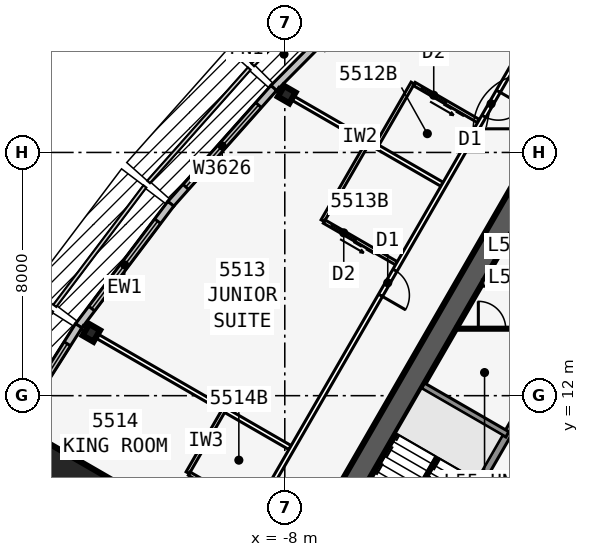
"""IFC4 building model, lengths in metres.
Left out: names, types, materials, properties, quantities, classifications, styles, units other than length and angle.
Written with IfcOpenShell. Run it as: python <this file> out.ifc"""

import sys

from ifc_helpers import new_model, si_unit, direction, frame, frame_2d, origin, origin_2d, place, context, subcontext, project, spatial, rectangle, i_section, extrude, element, fill, save


model = new_model("IFC4")
c1 = context("Model", 3, precision=1e-05, world=origin(), true_north=direction((0.0, 1.0)))
c2 = subcontext(c1, "Body", "Model", "MODEL_VIEW")
j1 = project(units=[si_unit("LENGTHUNIT", "METRE"), si_unit("PLANEANGLEUNIT", "RADIAN")], contexts=[c1])
p1 = place(None, origin())
s1 = spatial("IfcSite", under=j1, at=p1, CompositionType="ELEMENT")
p2 = place(p1, origin())
s2 = spatial("IfcBuilding", under=s1, at=p2, CompositionType="ELEMENT")
p3 = place(p2, frame((0.0, 0.0, 208.1)))
s3 = spatial("IfcBuildingStorey", under=s2, at=p3, CompositionType="ELEMENT", Elevation=208.1)
p4 = place(p3, frame((0.0, 19.052, 0.0), z_axis=(0.0, 0.0, 1.0), x_axis=(-0.499999749417, -0.866025548458, 0.0)))
e1 = element("IfcWall", 1, at=p4, inside=s3, PredefinedType="SHEAR", context=c2, shape_type="SweptSolid", body=[
    extrude(rectangle(XDim=33.0, YDim=0.75, at=frame_2d((16.5, 0.0))), origin(), (0.0, 0.0, 1.0), 3.6),
])
p5 = place(p4, frame((14.15, 0.0, 0.0)))
e2 = element("IfcOpeningElement", 2, at=p5, cuts=e1, PredefinedType="OPENING", context=c2, shape_type="SweptSolid", body=[
    extrude(rectangle(XDim=1.8, YDim=2.13, at=frame_2d((0.9, 1.065))), frame((0.0, 0.385, 0.0), z_axis=(0.0, -1.0, 0.0), x_axis=(1.0, 0.0, 0.0)), (0.0, 0.0, 1.0), 0.77),
])
p6 = place(p4, frame((12.6, 0.0, 0.0)))
e3 = element("IfcOpeningElement", 3, at=p6, cuts=e1, PredefinedType="OPENING", context=c2, shape_type="SweptSolid", body=[
    extrude(rectangle(XDim=1.0, YDim=2.13, at=frame_2d((0.5, 1.065))), frame((0.0, 0.385, 0.0), z_axis=(0.0, -1.0, 0.0), x_axis=(1.0, 0.0, 0.0)), (0.0, 0.0, 1.0), 0.77),
])
p7 = place(p3, frame((-0.062, 11.794, 0.0), z_axis=(0.0, 0.0, 1.0), x_axis=(-0.500006680225, -0.86602154692, 0.0)))
e4 = element("IfcWall", 4, at=p7, inside=s3, PredefinedType="SOLIDWALL", context=c2, shape_type="SweptSolid", body=[
    extrude(rectangle(XDim=7.733, YDim=0.25, at=frame_2d((3.866, 0.0))), origin(), (0.0, 0.0, 1.0), 3.435),
])
p8 = place(p3, frame((-0.679, 10.727, 0.0), z_axis=(0.0, 0.0, 1.0), x_axis=(-0.866008981251, 0.500028443584, 0.0)))
e5 = element("IfcWall", 5, at=p8, inside=s3, PredefinedType="SOLIDWALL", context=c2, shape_type="SweptSolid", body=[
    extrude(rectangle(XDim=3.2, YDim=0.2, at=frame_2d((1.6, 0.0))), origin(), (0.0, 0.0, 1.0), 3.435),
])
for number, where, z_axis, x_axis in (
    (6, (-7.937, 21.903, 0.0), (0.0, 0.0, 1.0), (-0.5, -0.866, 0.0)),
    (7, (-14.363, 14.066, 0.0), (0.0, 0.0, 1.0), (-0.866, 0.5, 0.0)),
):
    element("IfcColumn", number, at=place(p3, frame(where, z_axis=z_axis, x_axis=x_axis)), inside=s3, PredefinedType="COLUMN", context=c2, shape_type="SweptSolid", body=[
        extrude(i_section(OverallWidth=0.411, OverallDepth=0.434, WebThickness=0.036, FlangeThickness=0.057, at=origin_2d()), origin(), (0.0, 0.0, 1.0), 3.6),
    ])
p9 = place(p3, frame((-15.312, 8.84, 0.0), z_axis=(0.0, 0.0, 1.0), x_axis=(-0.866025403784, 0.5, 0.0)))
e8 = element("IfcColumn", 8, at=p9, inside=s3, PredefinedType="COLUMN", context=c2, shape_type="SweptSolid", body=[
    extrude(rectangle(XDim=2.3, YDim=2.3, at=origin_2d()), origin(), (0.0, 0.0, 1.0), 3.6),
])
p10 = place(p3, frame((-6.911, 23.583, 0.0), z_axis=(0.0, 0.0, 1.0), x_axis=(-0.704149946111, -0.710051303352, 0.0)))
e9 = element("IfcWall", 9, at=p10, inside=s3, PredefinedType="STANDARD", context=c2, shape_type="SweptSolid", body=[
    extrude(rectangle(XDim=2.069, YDim=0.25, at=frame_2d((1.034, 0.0))), origin(), (0.0, 0.0, 1.0), 3.435),
])
p11 = place(p3, frame((-8.363, 22.12, 0.0), z_axis=(0.0, 0.0, 1.0), x_axis=(-0.664348996191, -0.747422511876, 0.0)))
e10 = element("IfcWall", 10, at=p11, inside=s3, PredefinedType="STANDARD", context=c2, shape_type="SweptSolid", body=[
    extrude(rectangle(XDim=5.105, YDim=0.25, at=frame_2d((2.552, 0.0))), origin(), (0.0, 0.0, 1.0), 3.435),
])
p12 = place(p11, frame((0.752, 0.0, 0.45)))
e11 = element("IfcOpeningElement", 11, at=p12, cuts=e10, PredefinedType="OPENING", context=c2, shape_type="SweptSolid", body=[
    extrude(rectangle(XDim=3.6, YDim=2.6, at=frame_2d((1.8, 1.3))), frame((0.0, 0.135, 0.0), z_axis=(0.0, -1.0, 0.0), x_axis=(1.0, 0.0, 0.0)), (0.0, 0.0, 1.0), 0.27),
])
p13 = place(p3, frame((-11.748, 18.312, 0.0), z_axis=(0.0, 0.0, 1.0), x_axis=(-0.602408653511, -0.798187831388, 0.0)))
e12 = element("IfcWall", 12, at=p13, inside=s3, PredefinedType="STANDARD", context=c2, shape_type="SweptSolid", body=[
    extrude(rectangle(XDim=5.038, YDim=0.25, at=frame_2d((2.519, 0.0))), origin(), (0.0, 0.0, 1.0), 3.435),
])
p14 = place(p13, frame((0.719, 0.0, 0.45)))
e13 = element("IfcOpeningElement", 13, at=p14, cuts=e12, PredefinedType="OPENING", context=c2, shape_type="SweptSolid", body=[
    extrude(rectangle(XDim=3.6, YDim=2.6, at=frame_2d((1.8, 1.3))), frame((0.0, 0.135, 0.0), z_axis=(0.0, -1.0, 0.0), x_axis=(1.0, 0.0, 0.0)), (0.0, 0.0, 1.0), 0.27),
])
p15 = place(p3, frame((-14.777, 14.299, 0.0), z_axis=(0.0, 0.0, 1.0), x_axis=(-0.535220361449, -0.844712474568, 0.0)))
e14 = element("IfcWall", 14, at=p15, inside=s3, PredefinedType="STANDARD", context=c2, shape_type="SweptSolid", body=[
    extrude(rectangle(XDim=5.004, YDim=0.25, at=frame_2d((2.502, 0.0))), origin(), (0.0, 0.0, 1.0), 3.435),
])
p16 = place(p15, frame((0.702, 0.0, 0.45)))
e15 = element("IfcOpeningElement", 15, at=p16, cuts=e14, PredefinedType="OPENING", context=c2, shape_type="SweptSolid", body=[
    extrude(rectangle(XDim=3.6, YDim=2.6, at=frame_2d((1.8, 1.3))), frame((0.0, 0.135, 0.0), z_axis=(0.0, -1.0, 0.0), x_axis=(1.0, 0.0, 0.0)), (0.0, 0.0, 1.0), 0.27),
])
p17 = place(p3, frame((-0.425, 22.966, 0.0), z_axis=(0.0, 0.0, 1.0), x_axis=(-0.500000265775, -0.866025250339, 0.0)))
e16 = element("IfcWall", 16, at=p17, inside=s3, PredefinedType="PARTITIONING", context=c2, shape_type="SweptSolid", body=[
    extrude(rectangle(XDim=39.354, YDim=0.15, at=frame_2d((19.677, 0.0))), origin(), (0.0, 0.0, 1.0), 3.435),
])
p18 = place(p17, frame((1.102, 0.0, 0.0)))
e17 = element("IfcOpeningElement", 17, at=p18, cuts=e16, PredefinedType="OPENING", context=c2, shape_type="SweptSolid", body=[
    extrude(rectangle(XDim=0.95, YDim=2.13, at=frame_2d((0.475, 1.065))), frame((0.0, 0.085, 0.0), z_axis=(0.0, -1.0, 0.0), x_axis=(1.0, 0.0, 0.0)), (0.0, 0.0, 1.0), 0.17),
])
p19 = place(p17, frame((7.902, 0.0, 0.0)))
e18 = element("IfcOpeningElement", 18, at=p19, cuts=e16, PredefinedType="OPENING", context=c2, shape_type="SweptSolid", body=[
    extrude(rectangle(XDim=0.95, YDim=2.13, at=frame_2d((0.475, 1.065))), frame((0.0, 0.085, 0.0), z_axis=(0.0, -1.0, 0.0), x_axis=(1.0, 0.0, 0.0)), (0.0, 0.0, 1.0), 0.17),
])
p20 = place(p17, frame((17.302, 0.0, 0.0)))
e19 = element("IfcOpeningElement", 19, at=p20, cuts=e16, PredefinedType="OPENING", context=c2, shape_type="SweptSolid", body=[
    extrude(rectangle(XDim=0.95, YDim=2.13, at=frame_2d((0.475, 1.065))), frame((0.0, 0.085, 0.0), z_axis=(0.0, -1.0, 0.0), x_axis=(1.0, 0.0, 0.0)), (0.0, 0.0, 1.0), 0.17),
])
p21 = place(p17, frame((26.702, 0.0, 0.0)))
e20 = element("IfcOpeningElement", 20, at=p21, cuts=e16, PredefinedType="OPENING", context=c2, shape_type="SweptSolid", body=[
    extrude(rectangle(XDim=0.95, YDim=2.13, at=frame_2d((0.475, 1.065))), frame((0.0, 0.085, 0.0), z_axis=(0.0, -1.0, 0.0), x_axis=(1.0, 0.0, 0.0)), (0.0, 0.0, 1.0), 0.17),
])
p22 = place(p17, frame((37.302, 0.0, 0.0)))
e21 = element("IfcOpeningElement", 21, at=p22, cuts=e16, PredefinedType="OPENING", context=c2, shape_type="SweptSolid", body=[
    extrude(rectangle(XDim=0.95, YDim=2.13, at=frame_2d((0.475, 1.065))), frame((0.0, 0.085, 0.0), z_axis=(0.0, -1.0, 0.0), x_axis=(1.0, 0.0, 0.0)), (0.0, 0.0, 1.0), 0.17),
])
p23 = place(p3, frame((-2.829, 18.954, 0.0), z_axis=(0.0, 0.0, 1.0), x_axis=(-0.866026604282, 0.499997920671, 0.0)))
e22 = element("IfcWall", 22, at=p23, inside=s3, PredefinedType="PARTITIONING", context=c2, shape_type="SweptSolid", body=[
    extrude(rectangle(XDim=6.24, YDim=0.15, at=frame_2d((3.12, 0.0))), origin(), (0.0, 0.0, 1.0), 2.589),
])
p24 = place(p3, frame((-7.829, 10.293, 0.0), z_axis=(0.0, 0.0, 1.0), x_axis=(-0.866030558329, 0.49999107196, 0.0)))
e23 = element("IfcWall", 23, at=p24, inside=s3, PredefinedType="PARTITIONING", context=c2, shape_type="SweptSolid", body=[
    extrude(rectangle(XDim=7.894, YDim=0.15, at=frame_2d((3.947, 0.0))), origin(), (0.0, 0.0, 1.0), 2.589),
])
p25 = place(p3, frame((-10.329, 5.963, 0.0), z_axis=(0.0, 0.0, 1.0), x_axis=(-0.866016460812, 0.500015489362, 0.0)))
e24 = element("IfcWall", 24, at=p25, inside=s3, PredefinedType="PARTITIONING", context=c2, shape_type="SweptSolid", body=[
    extrude(rectangle(XDim=8.101, YDim=0.15, at=frame_2d((4.051, 0.0))), origin(), (0.0, 0.0, 1.0), 2.589),
])
p26 = place(p3, frame((-3.793, 22.282, 0.0), z_axis=(0.0, 0.0, 1.0), x_axis=(-0.500001309137, -0.866024647952, 0.0)))
e25 = element("IfcWall", 25, at=p26, inside=s3, PredefinedType="PLUMBINGWALL", context=c2, shape_type="SweptSolid", body=[
    extrude(rectangle(XDim=2.4, YDim=0.12, at=frame_2d((1.2, 0.0))), origin(), (0.0, 0.0, 1.0), 3.435),
])
p27 = place(p3, frame((-1.628, 21.032, 0.0), z_axis=(0.0, 0.0, 1.0), x_axis=(-0.866048967903, 0.499959183527, 0.0)))
e26 = element("IfcWall", 26, at=p27, inside=s3, PredefinedType="PLUMBINGWALL", context=c2, shape_type="SweptSolid", body=[
    extrude(rectangle(XDim=2.44, YDim=0.12, at=frame_2d((1.22, 0.0))), origin(), (0.0, 0.0, 1.0), 3.435),
])
p28 = place(p27, frame((1.25, 0.0, 0.0)))
e27 = element("IfcOpeningElement", 27, at=p28, cuts=e26, PredefinedType="OPENING", context=c2, shape_type="SweptSolid", body=[
    extrude(rectangle(XDim=0.9, YDim=2.13, at=frame_2d((0.45, 1.065))), frame((0.0, 0.07, 0.0), z_axis=(0.0, -1.0, 0.0), x_axis=(1.0, 0.0, 0.0)), (0.0, 0.0, 1.0), 0.14),
])
p29 = place(p3, frame((-5.253, 20.354, 0.0), z_axis=(0.0, 0.0, 1.0), x_axis=(-0.499990139034, -0.866031096941, 0.0)))
e28 = element("IfcWall", 28, at=p29, inside=s3, PredefinedType="PLUMBINGWALL", context=c2, shape_type="SweptSolid", body=[
    extrude(rectangle(XDim=3.0, YDim=0.12, at=frame_2d((1.5, 0.0))), origin(), (0.0, 0.0, 1.0), 3.435),
])
p30 = place(p3, frame((-4.329, 16.355, 0.0), z_axis=(0.0, 0.0, 1.0), x_axis=(-0.866035715982, 0.499982138324, 0.0)))
e29 = element("IfcWall", 29, at=p30, inside=s3, PredefinedType="PLUMBINGWALL", context=c2, shape_type="SweptSolid", body=[
    extrude(rectangle(XDim=2.74, YDim=0.12, at=frame_2d((1.37, 0.0))), origin(), (0.0, 0.0, 1.0), 3.435),
])
p31 = place(p30, frame((1.55, 0.0, 0.0)))
e30 = element("IfcOpeningElement", 30, at=p31, cuts=e29, PredefinedType="OPENING", context=c2, shape_type="SweptSolid", body=[
    extrude(rectangle(XDim=0.9, YDim=2.13, at=frame_2d((0.45, 1.065))), frame((0.0, 0.07, 0.0), z_axis=(0.0, -1.0, 0.0), x_axis=(1.0, 0.0, 0.0)), (0.0, 0.0, 1.0), 0.14),
])
p32 = place(p3, frame((-9.993, 11.543, 0.0), z_axis=(0.0, 0.0, 1.0), x_axis=(-0.500077600433, -0.865980596518, 0.0)))
e31 = element("IfcWall", 31, at=p32, inside=s3, PredefinedType="PLUMBINGWALL", context=c2, shape_type="SweptSolid", body=[
    extrude(rectangle(XDim=2.4, YDim=0.12, at=frame_2d((1.2, 0.0))), origin(), (0.0, 0.0, 1.0), 3.435),
])
p33 = place(p3, frame((-9.029, 8.215, 0.0), z_axis=(0.0, 0.0, 1.0), x_axis=(-0.866023955769, 0.500002508028, 0.0)))
e32 = element("IfcWall", 32, at=p33, inside=s3, PredefinedType="PLUMBINGWALL", context=c2, shape_type="SweptSolid", body=[
    extrude(rectangle(XDim=2.44, YDim=0.12, at=frame_2d((1.22, 0.0))), origin(), (0.0, 0.0, 1.0), 3.435),
])
p34 = place(p33, frame((1.25, 0.0, 0.0)))
e33 = element("IfcOpeningElement", 33, at=p34, cuts=e32, PredefinedType="OPENING", context=c2, shape_type="SweptSolid", body=[
    extrude(rectangle(XDim=0.9, YDim=2.13, at=frame_2d((0.45, 1.065))), frame((0.0, 0.07, 0.0), z_axis=(0.0, -1.0, 0.0), x_axis=(1.0, 0.0, 0.0)), (0.0, 0.0, 1.0), 0.14),
])
p35 = place(p3, frame((-1.501, 15.703, 0.0), z_axis=(0.0, 0.0, 1.0), x_axis=(1.0, 0.0, 0.0)))
e34 = element("IfcWall", 34, at=p35, inside=s3, PredefinedType="SOLIDWALL", context=c2, shape_type="SweptSolid", body=[
    extrude(rectangle(XDim=3.002, YDim=0.2, at=frame_2d((1.501, 0.0))), origin(), (0.0, 0.0, 1.0), 3.435),
])
p36 = place(p3, frame((-2.367, 14.203, 0.0), z_axis=(0.0, 0.0, 1.0), x_axis=(1.0, 0.0, 0.0)))
e35 = element("IfcWall", 35, at=p36, inside=s3, PredefinedType="PARTITIONING", context=c2, shape_type="SweptSolid", body=[
    extrude(rectangle(XDim=4.734, YDim=0.1, at=frame_2d((2.367, 0.0))), origin(), (0.0, 0.0, 1.0), 3.435),
])
p37 = place(p36, frame((0.734, 0.0, 0.0)))
e36 = element("IfcOpeningElement", 36, at=p37, cuts=e35, PredefinedType="OPENING", context=c2, shape_type="SweptSolid", body=[
    extrude(rectangle(XDim=0.9, YDim=2.13, at=frame_2d((0.45, 1.065))), frame((0.0, 0.06, 0.0), z_axis=(0.0, -1.0, 0.0), x_axis=(1.0, 0.0, 0.0)), (0.0, 0.0, 1.0), 0.12),
])
p38 = place(p3, frame((-2.988, 9.978, 0.0), z_axis=(0.0, 0.0, 1.0), x_axis=(-0.499992232847, -0.866029888106, 0.0)))
e37 = element("IfcWall", 37, at=p38, inside=s3, PredefinedType="SOLIDWALL", context=c2, shape_type="SweptSolid", body=[
    extrude(rectangle(XDim=2.794, YDim=0.1, at=frame_2d((1.397, 0.0))), origin(), (0.0, 0.0, 1.0), 3.6),
])
p39 = place(p12, origin())
e38 = element("IfcWindow", 38, at=p39, inside=s3, PartitioningType="SINGLE_PANEL", PredefinedType="WINDOW", context=c2, shape_type="SweptSolid", body=[
    extrude(rectangle(XDim=3.6, YDim=2.6, at=frame_2d((1.8, 1.3))), frame((0.0, 0.03, 0.0), z_axis=(0.0, -1.0, 0.0), x_axis=(1.0, 0.0, 0.0)), (0.0, 0.0, 1.0), 0.06),
])
fill(e11, e38)
p40 = place(p14, origin())
e39 = element("IfcWindow", 39, at=p40, inside=s3, PartitioningType="SINGLE_PANEL", PredefinedType="WINDOW", context=c2, shape_type="SweptSolid", body=[
    extrude(rectangle(XDim=3.6, YDim=2.6, at=frame_2d((1.8, 1.3))), frame((0.0, 0.03, 0.0), z_axis=(0.0, -1.0, 0.0), x_axis=(1.0, 0.0, 0.0)), (0.0, 0.0, 1.0), 0.06),
])
fill(e13, e39)
p41 = place(p16, origin())
e40 = element("IfcWindow", 40, at=p41, inside=s3, PartitioningType="SINGLE_PANEL", PredefinedType="WINDOW", context=c2, shape_type="SweptSolid", body=[
    extrude(rectangle(XDim=3.6, YDim=2.6, at=frame_2d((1.8, 1.3))), frame((0.0, 0.03, 0.0), z_axis=(0.0, -1.0, 0.0), x_axis=(1.0, 0.0, 0.0)), (0.0, 0.0, 1.0), 0.06),
])
fill(e15, e40)
p42 = place(p28, origin())
e41 = element("IfcDoor", 41, at=p42, inside=s3, OperationType="SLIDING_TO_LEFT", PredefinedType="DOOR", context=c2, shape_type="SweptSolid", body=[
    extrude(rectangle(XDim=0.9, YDim=2.13, at=frame_2d((0.45, 1.065))), frame((0.0, 0.025, 0.0), z_axis=(0.0, -1.0, 0.0), x_axis=(1.0, 0.0, 0.0)), (0.0, 0.0, 1.0), 0.05),
])
fill(e27, e41)
p43 = place(p18, origin())
e42 = element("IfcDoor", 42, at=p43, inside=s3, OperationType="SINGLE_SWING_LEFT", PredefinedType="DOOR", context=c2, shape_type="SweptSolid", body=[
    extrude(rectangle(XDim=0.95, YDim=2.13, at=frame_2d((0.475, 1.065))), frame((0.0, 0.025, 0.0), z_axis=(0.0, -1.0, 0.0), x_axis=(1.0, 0.0, 0.0)), (0.0, 0.0, 1.0), 0.05),
])
fill(e17, e42)
p44 = place(p31, origin())
e43 = element("IfcDoor", 43, at=p44, inside=s3, OperationType="SLIDING_TO_LEFT", PredefinedType="DOOR", context=c2, shape_type="SweptSolid", body=[
    extrude(rectangle(XDim=0.9, YDim=2.13, at=frame_2d((0.45, 1.065))), frame((0.0, 0.025, 0.0), z_axis=(0.0, -1.0, 0.0), x_axis=(1.0, 0.0, 0.0)), (0.0, 0.0, 1.0), 0.05),
])
fill(e30, e43)
p45 = place(p19, origin())
e44 = element("IfcDoor", 44, at=p45, inside=s3, OperationType="SINGLE_SWING_RIGHT", PredefinedType="DOOR", context=c2, shape_type="SweptSolid", body=[
    extrude(rectangle(XDim=0.95, YDim=2.13, at=frame_2d((0.475, 1.065))), frame((0.0, 0.025, 0.0), z_axis=(0.0, -1.0, 0.0), x_axis=(1.0, 0.0, 0.0)), (0.0, 0.0, 1.0), 0.05),
])
fill(e18, e44)
p46 = place(p34, origin())
e45 = element("IfcDoor", 45, at=p46, inside=s3, OperationType="SLIDING_TO_LEFT", PredefinedType="DOOR", context=c2, shape_type="SweptSolid", body=[
    extrude(rectangle(XDim=0.9, YDim=2.13, at=frame_2d((0.45, 1.065))), frame((0.0, 0.025, 0.0), z_axis=(0.0, -1.0, 0.0), x_axis=(1.0, 0.0, 0.0)), (0.0, 0.0, 1.0), 0.05),
])
fill(e33, e45)
p47 = place(p37, origin())
e46 = element("IfcDoor", 46, at=p47, inside=s3, OperationType="SINGLE_SWING_LEFT", PredefinedType="DOOR", context=c2, shape_type="SweptSolid", body=[
    extrude(rectangle(XDim=0.9, YDim=2.13, at=frame_2d((0.45, 1.065))), frame((0.0, 0.025, 0.0), z_axis=(0.0, -1.0, 0.0), x_axis=(1.0, 0.0, 0.0)), (0.0, 0.0, 1.0), 0.05),
])
fill(e36, e46)
save(model, sys.argv[1])
